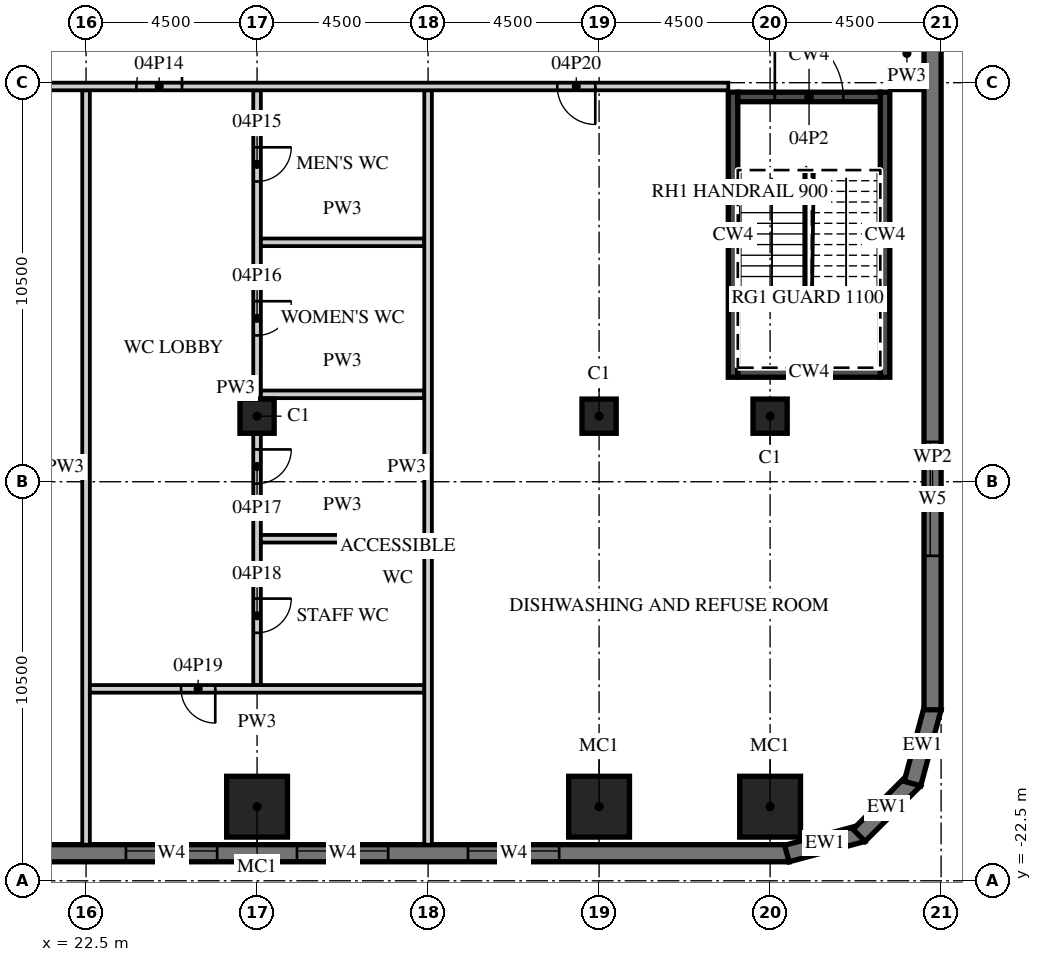
"""IFC4 building model, lengths in metres.
Left out: names, types, materials, properties, quantities, classifications, styles, units other than length and angle.
Written with IfcOpenShell. Run it as: python <this file> out.ifc"""

import sys

from ifc_helpers import new_model, si_unit, direction, frame, frame_2d, origin, origin_2d, place, context, subcontext, project, spatial, polyline, rectangle, outline, extrude, element, fill, save


model = new_model("IFC4")
c1 = context("Model", 3, precision=1e-05, world=origin(), true_north=direction((0.0, 1.0)))
c2 = subcontext(c1, "Body", "Model", "MODEL_VIEW")
j1 = project(units=[si_unit("LENGTHUNIT", "METRE"), si_unit("PLANEANGLEUNIT", "RADIAN")], contexts=[c1])
p1 = place(None, origin())
s1 = spatial("IfcSite", under=j1, at=p1, CompositionType="ELEMENT")
p2 = place(p1, origin())
s2 = spatial("IfcBuilding", under=s1, at=p2, CompositionType="ELEMENT")
p3 = place(p2, frame((0.0, 0.0, 29.0)))
s3 = spatial("IfcBuildingStorey", under=s2, at=p3, CompositionType="ELEMENT", Elevation=29.0)
for number, where, z_axis, x_axis in (
    (1, (27.0, -20.55, 0.0), (0.0, 0.0, 1.0), (1.0, 0.0, 0.0)),
    (2, (36.0, -20.55, 0.0), (0.0, 0.0, 1.0), (1.0, 0.0, 0.0)),
    (3, (40.5, -20.55, 0.0), (0.0, 0.0, 1.0), (1.0, 0.0, 0.0)),
):
    element("IfcColumn", number, at=place(p3, frame(where, z_axis=z_axis, x_axis=x_axis)), inside=s3, PredefinedType="COLUMN", context=c2, shape_type="SweptSolid", body=[
        extrude(rectangle(XDim=1.6, YDim=1.6, at=origin_2d()), origin(), (0.0, 0.0, 1.0), 4.5),
    ])
for number, where, z_axis, x_axis in (
    (4, (27.0, -10.275, 0.0), (0.0, 0.0, 1.0), (1.0, 0.0, 0.0)),
    (5, (36.0, -10.275, 0.0), (0.0, 0.0, 1.0), (1.0, 0.0, 0.0)),
    (6, (40.5, -10.275, 0.0), (0.0, 0.0, 1.0), (1.0, 0.0, 0.0)),
):
    element("IfcColumn", number, at=place(p3, frame(where, z_axis=z_axis, x_axis=x_axis)), inside=s3, PredefinedType="COLUMN", context=c2, shape_type="SweptSolid", body=[
        extrude(rectangle(XDim=0.9, YDim=0.9, at=origin_2d()), origin(), (0.0, 0.0, 1.0), 4.5),
    ])
p4 = place(p3, frame((-13.5, -21.775, 0.0), z_axis=(0.0, 0.0, 1.0), x_axis=(1.0, 0.0, 0.0)))
e7 = element("IfcWall", 7, at=p4, inside=s3, PredefinedType="SOLIDWALL", context=c2, shape_type="SweptSolid", body=[
    extrude(rectangle(XDim=54.5, YDim=0.45, at=frame_2d((27.25, 0.0))), origin(), (0.0, 0.0, 1.0), 4.05),
])
p5 = place(p4, frame((1.05, 0.0, 0.9)))
e8 = element("IfcOpeningElement", 8, at=p5, cuts=e7, PredefinedType="OPENING", context=c2, shape_type="SweptSolid", body=[
    extrude(rectangle(XDim=2.4, YDim=1.8, at=frame_2d((1.2, 0.9))), frame((0.0, 0.235, 0.0), z_axis=(0.0, -1.0, 0.0), x_axis=(1.0, 0.0, 0.0)), (0.0, 0.0, 1.0), 0.47),
])
p6 = place(p4, frame((5.55, 0.0, 0.9)))
e9 = element("IfcOpeningElement", 9, at=p6, cuts=e7, PredefinedType="OPENING", context=c2, shape_type="SweptSolid", body=[
    extrude(rectangle(XDim=2.4, YDim=1.8, at=frame_2d((1.2, 0.9))), frame((0.0, 0.235, 0.0), z_axis=(0.0, -1.0, 0.0), x_axis=(1.0, 0.0, 0.0)), (0.0, 0.0, 1.0), 0.47),
])
p7 = place(p4, frame((10.05, 0.0, 0.9)))
e10 = element("IfcOpeningElement", 10, at=p7, cuts=e7, PredefinedType="OPENING", context=c2, shape_type="SweptSolid", body=[
    extrude(rectangle(XDim=2.4, YDim=1.8, at=frame_2d((1.2, 0.9))), frame((0.0, 0.235, 0.0), z_axis=(0.0, -1.0, 0.0), x_axis=(1.0, 0.0, 0.0)), (0.0, 0.0, 1.0), 0.47),
])
p8 = place(p4, frame((14.55, 0.0, 0.9)))
e11 = element("IfcOpeningElement", 11, at=p8, cuts=e7, PredefinedType="OPENING", context=c2, shape_type="SweptSolid", body=[
    extrude(rectangle(XDim=2.4, YDim=1.8, at=frame_2d((1.2, 0.9))), frame((0.0, 0.235, 0.0), z_axis=(0.0, -1.0, 0.0), x_axis=(1.0, 0.0, 0.0)), (0.0, 0.0, 1.0), 0.47),
])
p9 = place(p4, frame((19.05, 0.0, 0.9)))
e12 = element("IfcOpeningElement", 12, at=p9, cuts=e7, PredefinedType="OPENING", context=c2, shape_type="SweptSolid", body=[
    extrude(rectangle(XDim=2.4, YDim=1.8, at=frame_2d((1.2, 0.9))), frame((0.0, 0.235, 0.0), z_axis=(0.0, -1.0, 0.0), x_axis=(1.0, 0.0, 0.0)), (0.0, 0.0, 1.0), 0.47),
])
p10 = place(p4, frame((23.55, 0.0, 0.9)))
e13 = element("IfcOpeningElement", 13, at=p10, cuts=e7, PredefinedType="OPENING", context=c2, shape_type="SweptSolid", body=[
    extrude(rectangle(XDim=2.4, YDim=1.8, at=frame_2d((1.2, 0.9))), frame((0.0, 0.235, 0.0), z_axis=(0.0, -1.0, 0.0), x_axis=(1.0, 0.0, 0.0)), (0.0, 0.0, 1.0), 0.47),
])
p11 = place(p4, frame((28.05, 0.0, 0.9)))
e14 = element("IfcOpeningElement", 14, at=p11, cuts=e7, PredefinedType="OPENING", context=c2, shape_type="SweptSolid", body=[
    extrude(rectangle(XDim=2.4, YDim=1.8, at=frame_2d((1.2, 0.9))), frame((0.0, 0.235, 0.0), z_axis=(0.0, -1.0, 0.0), x_axis=(1.0, 0.0, 0.0)), (0.0, 0.0, 1.0), 0.47),
])
p12 = place(p4, frame((32.55, 0.0, 0.9)))
e15 = element("IfcOpeningElement", 15, at=p12, cuts=e7, PredefinedType="OPENING", context=c2, shape_type="SweptSolid", body=[
    extrude(rectangle(XDim=2.4, YDim=1.8, at=frame_2d((1.2, 0.9))), frame((0.0, 0.235, 0.0), z_axis=(0.0, -1.0, 0.0), x_axis=(1.0, 0.0, 0.0)), (0.0, 0.0, 1.0), 0.47),
])
p13 = place(p4, frame((37.05, 0.0, 0.9)))
e16 = element("IfcOpeningElement", 16, at=p13, cuts=e7, PredefinedType="OPENING", context=c2, shape_type="SweptSolid", body=[
    extrude(rectangle(XDim=2.4, YDim=1.8, at=frame_2d((1.2, 0.9))), frame((0.0, 0.235, 0.0), z_axis=(0.0, -1.0, 0.0), x_axis=(1.0, 0.0, 0.0)), (0.0, 0.0, 1.0), 0.47),
])
p14 = place(p4, frame((41.55, 0.0, 0.9)))
e17 = element("IfcOpeningElement", 17, at=p14, cuts=e7, PredefinedType="OPENING", context=c2, shape_type="SweptSolid", body=[
    extrude(rectangle(XDim=2.4, YDim=1.8, at=frame_2d((1.2, 0.9))), frame((0.0, 0.235, 0.0), z_axis=(0.0, -1.0, 0.0), x_axis=(1.0, 0.0, 0.0)), (0.0, 0.0, 1.0), 0.47),
])
p15 = place(p4, frame((46.05, 0.0, 0.9)))
e18 = element("IfcOpeningElement", 18, at=p15, cuts=e7, PredefinedType="OPENING", context=c2, shape_type="SweptSolid", body=[
    extrude(rectangle(XDim=2.4, YDim=1.8, at=frame_2d((1.2, 0.9))), frame((0.0, 0.235, 0.0), z_axis=(0.0, -1.0, 0.0), x_axis=(1.0, 0.0, 0.0)), (0.0, 0.0, 1.0), 0.47),
])
p16 = place(p3, frame((40.942, -21.783, 0.0), z_axis=(0.0, 0.0, 1.0), x_axis=(0.965926999034, 0.25881466832, 0.0)))
e19 = element("IfcWall", 19, at=p16, inside=s3, PredefinedType="SOLIDWALL", context=c2, shape_type="SweptSolid", body=[
    extrude(outline(polyline([(0.0, -0.225), (2.071, -0.225), (1.95, 0.225), (0.121, 0.225), (0.0, -0.225)])), origin(), (0.0, 0.0, 1.0), 4.05),
])
p17 = place(p3, frame((42.841, -21.305, 0.0), z_axis=(0.0, 0.0, 1.0), x_axis=(0.707106781187, 0.707106781187, 0.0)))
e20 = element("IfcWall", 20, at=p17, inside=s3, PredefinedType="SOLIDWALL", context=c2, shape_type="SweptSolid", body=[
    extrude(outline(polyline([(0.0, -0.225), (2.071, -0.225), (1.95, 0.225), (0.121, 0.225), (0.0, -0.225)])), origin(), (0.0, 0.0, 1.0), 4.05),
])
p18 = place(p3, frame((44.247, -19.942, 0.0), z_axis=(0.0, 0.0, 1.0), x_axis=(0.25881466832, 0.965926999034, 0.0)))
e21 = element("IfcWall", 21, at=p18, inside=s3, PredefinedType="SOLIDWALL", context=c2, shape_type="SweptSolid", body=[
    extrude(outline(polyline([(-0.0, -0.225), (2.07, -0.225), (1.95, 0.225), (0.12, 0.225), (-0.0, -0.225)])), origin(), (0.0, 0.0, 1.0), 4.05),
])
p19 = place(p3, frame((44.775, -18.0, 0.0), z_axis=(0.0, 0.0, 1.0), x_axis=(0.0, 1.0, 0.0)))
e22 = element("IfcWall", 22, at=p19, inside=s3, PredefinedType="SOLIDWALL", context=c2, shape_type="SweptSolid", body=[
    extrude(rectangle(XDim=36.0, YDim=0.45, at=frame_2d((18.0, 0.0))), origin(), (0.0, 0.0, 1.0), 4.05),
])
p20 = place(p19, frame((4.05, 0.0, 0.9)))
e23 = element("IfcOpeningElement", 23, at=p20, cuts=e22, PredefinedType="OPENING", context=c2, shape_type="SweptSolid", body=[
    extrude(rectangle(XDim=3.0, YDim=1.8, at=frame_2d((1.5, 0.9))), frame((0.0, 0.235, 0.0), z_axis=(0.0, -1.0, 0.0), x_axis=(1.0, 0.0, 0.0)), (0.0, 0.0, 1.0), 0.47),
])
for number, where, z_axis, x_axis in (
    (24, (39.525, -9.25, 0.0), (0.0, 0.0, 1.0), (0.0, 1.0, 0.0)),
    (25, (43.525, -9.25, 0.0), (0.0, 0.0, 1.0), (0.0, 1.0, 0.0)),
):
    element("IfcWall", number, at=place(p3, frame(where, z_axis=z_axis, x_axis=x_axis)), inside=s3, PredefinedType="SHEAR", context=c2, shape_type="SweptSolid", body=[
        extrude(rectangle(XDim=7.5, YDim=0.25, at=frame_2d((3.75, 0.0))), origin(), (0.0, 0.0, 1.0), 4.05),
    ])
p21 = place(p3, frame((39.65, -9.125, 0.0), z_axis=(0.0, 0.0, 1.0), x_axis=(1.0, 0.0, 0.0)))
e26 = element("IfcWall", 26, at=p21, inside=s3, PredefinedType="SHEAR", context=c2, shape_type="SweptSolid", body=[
    extrude(rectangle(XDim=3.75, YDim=0.25, at=frame_2d((1.875, 0.0))), origin(), (0.0, 0.0, 1.0), 4.05),
])
p22 = place(p3, frame((39.65, -1.875, 0.0), z_axis=(0.0, 0.0, 1.0), x_axis=(1.0, 0.0, 0.0)))
e27 = element("IfcWall", 27, at=p22, inside=s3, PredefinedType="SHEAR", context=c2, shape_type="SweptSolid", body=[
    extrude(rectangle(XDim=3.75, YDim=0.25, at=frame_2d((1.875, 0.0))), origin(), (0.0, 0.0, 1.0), 4.05),
])
p23 = place(p22, frame((0.975, 0.0, 0.0)))
e28 = element("IfcOpeningElement", 28, at=p23, cuts=e27, PredefinedType="OPENING", context=c2, shape_type="SweptSolid", body=[
    extrude(rectangle(XDim=1.8, YDim=2.1, at=frame_2d((0.9, 1.05))), frame((0.0, 0.135, 0.0), z_axis=(0.0, -1.0, 0.0), x_axis=(1.0, 0.0, 0.0)), (0.0, 0.0, 1.0), 0.27),
])
p24 = place(p3, frame((22.5, -21.55, 0.0), z_axis=(0.0, 0.0, 1.0), x_axis=(0.0, 1.0, 0.0)))
e29 = element("IfcWall", 29, at=p24, inside=s3, PredefinedType="PARTITIONING", context=c2, shape_type="SweptSolid", body=[
    extrude(rectangle(XDim=19.85, YDim=0.2, at=frame_2d((9.925, 0.0))), origin(), (0.0, 0.0, 1.0), 4.05),
])
p25 = place(p3, frame((27.0, -17.35, 0.0), z_axis=(0.0, 0.0, 1.0), x_axis=(0.0, 1.0, 0.0)))
e30 = element("IfcWall", 30, at=p25, inside=s3, PredefinedType="PARTITIONING", context=c2, shape_type="SweptSolid", body=[
    extrude(rectangle(XDim=15.65, YDim=0.2, at=frame_2d((7.825, 0.0))), origin(), (0.0, 0.0, 1.0), 4.05),
])
p26 = place(p25, frame((13.25, 0.0, 0.0)))
e31 = element("IfcOpeningElement", 31, at=p26, cuts=e30, PredefinedType="OPENING", context=c2, shape_type="SweptSolid", body=[
    extrude(rectangle(XDim=0.9, YDim=2.1, at=frame_2d((0.45, 1.05))), frame((0.0, 0.11, 0.0), z_axis=(0.0, -1.0, 0.0), x_axis=(1.0, 0.0, 0.0)), (0.0, 0.0, 1.0), 0.22),
])
p27 = place(p25, frame((9.2, 0.0, 0.0)))
e32 = element("IfcOpeningElement", 32, at=p27, cuts=e30, PredefinedType="OPENING", context=c2, shape_type="SweptSolid", body=[
    extrude(rectangle(XDim=0.9, YDim=2.1, at=frame_2d((0.45, 1.05))), frame((0.0, 0.11, 0.0), z_axis=(0.0, -1.0, 0.0), x_axis=(1.0, 0.0, 0.0)), (0.0, 0.0, 1.0), 0.22),
])
p28 = place(p25, frame((5.3, 0.0, 0.0)))
e33 = element("IfcOpeningElement", 33, at=p28, cuts=e30, PredefinedType="OPENING", context=c2, shape_type="SweptSolid", body=[
    extrude(rectangle(XDim=0.9, YDim=2.1, at=frame_2d((0.45, 1.05))), frame((0.0, 0.11, 0.0), z_axis=(0.0, -1.0, 0.0), x_axis=(1.0, 0.0, 0.0)), (0.0, 0.0, 1.0), 0.22),
])
p29 = place(p25, frame((1.375, 0.0, 0.0)))
e34 = element("IfcOpeningElement", 34, at=p29, cuts=e30, PredefinedType="OPENING", context=c2, shape_type="SweptSolid", body=[
    extrude(rectangle(XDim=0.9, YDim=2.1, at=frame_2d((0.45, 1.05))), frame((0.0, 0.11, 0.0), z_axis=(0.0, -1.0, 0.0), x_axis=(1.0, 0.0, 0.0)), (0.0, 0.0, 1.0), 0.22),
])
for number, where, z_axis, x_axis in (
    (35, (27.1, -5.7, 0.0), (0.0, 0.0, 1.0), (1.0, 0.0, 0.0)),
    (36, (27.1, -9.7, 0.0), (0.0, 0.0, 1.0), (1.0, 0.0, 0.0)),
    (37, (27.1, -13.5, 0.0), (0.0, 0.0, 1.0), (1.0, 0.0, 0.0)),
):
    element("IfcWall", number, at=place(p3, frame(where, z_axis=z_axis, x_axis=x_axis)), inside=s3, PredefinedType="PARTITIONING", context=c2, shape_type="SweptSolid", body=[
        extrude(rectangle(XDim=4.3, YDim=0.2, at=frame_2d((2.15, 0.0))), origin(), (0.0, 0.0, 1.0), 4.05),
    ])
p30 = place(p3, frame((22.6, -17.45, 0.0), z_axis=(0.0, 0.0, 1.0), x_axis=(1.0, 0.0, 0.0)))
e38 = element("IfcWall", 38, at=p30, inside=s3, PredefinedType="PARTITIONING", context=c2, shape_type="SweptSolid", body=[
    extrude(rectangle(XDim=8.8, YDim=0.2, at=frame_2d((4.4, 0.0))), origin(), (0.0, 0.0, 1.0), 4.05),
])
p31 = place(p30, frame((2.4, 0.0, 0.0)))
e39 = element("IfcOpeningElement", 39, at=p31, cuts=e38, PredefinedType="OPENING", context=c2, shape_type="SweptSolid", body=[
    extrude(rectangle(XDim=0.9, YDim=2.1, at=frame_2d((0.45, 1.05))), frame((0.0, 0.11, 0.0), z_axis=(0.0, -1.0, 0.0), x_axis=(1.0, 0.0, 0.0)), (0.0, 0.0, 1.0), 0.22),
])
p32 = place(p3, frame((31.5, -21.55, 0.0), z_axis=(0.0, 0.0, 1.0), x_axis=(0.0, 1.0, 0.0)))
e40 = element("IfcWall", 40, at=p32, inside=s3, PredefinedType="PARTITIONING", context=c2, shape_type="SweptSolid", body=[
    extrude(rectangle(XDim=19.85, YDim=0.2, at=frame_2d((9.925, 0.0))), origin(), (0.0, 0.0, 1.0), 4.05),
])
p33 = place(p3, frame((-13.3, -1.6, 0.0), z_axis=(0.0, 0.0, 1.0), x_axis=(1.0, 0.0, 0.0)))
e41 = element("IfcWall", 41, at=p33, inside=s3, PredefinedType="PARTITIONING", context=c2, shape_type="SweptSolid", body=[
    extrude(rectangle(XDim=52.7, YDim=0.2, at=frame_2d((26.35, 0.0))), origin(), (0.0, 0.0, 1.0), 4.05),
])
p34 = place(p33, frame((10.21, 0.0, 0.0)))
e42 = element("IfcOpeningElement", 42, at=p34, cuts=e41, PredefinedType="OPENING", context=c2, shape_type="SweptSolid", body=[
    extrude(rectangle(XDim=1.0, YDim=2.1, at=frame_2d((0.5, 1.05))), frame((0.0, 0.11, 0.0), z_axis=(0.0, -1.0, 0.0), x_axis=(1.0, 0.0, 0.0)), (0.0, 0.0, 1.0), 0.22),
])
p35 = place(p33, frame((24.49, 0.0, 0.0)))
e43 = element("IfcOpeningElement", 43, at=p35, cuts=e41, PredefinedType="OPENING", context=c2, shape_type="SweptSolid", body=[
    extrude(rectangle(XDim=1.0, YDim=2.1, at=frame_2d((0.5, 1.05))), frame((0.0, 0.11, 0.0), z_axis=(0.0, -1.0, 0.0), x_axis=(1.0, 0.0, 0.0)), (0.0, 0.0, 1.0), 0.22),
])
p36 = place(p33, frame((37.125, 0.0, 0.0)))
e44 = element("IfcOpeningElement", 44, at=p36, cuts=e41, PredefinedType="OPENING", context=c2, shape_type="SweptSolid", body=[
    extrude(rectangle(XDim=1.2, YDim=2.1, at=frame_2d((0.6, 1.05))), frame((0.0, 0.11, 0.0), z_axis=(0.0, -1.0, 0.0), x_axis=(1.0, 0.0, 0.0)), (0.0, 0.0, 1.0), 0.22),
])
p37 = place(p33, frame((48.2, 0.0, 0.0)))
e45 = element("IfcOpeningElement", 45, at=p37, cuts=e41, PredefinedType="OPENING", context=c2, shape_type="SweptSolid", body=[
    extrude(rectangle(XDim=1.0, YDim=2.1, at=frame_2d((0.5, 1.05))), frame((0.0, 0.11, 0.0), z_axis=(0.0, -1.0, 0.0), x_axis=(1.0, 0.0, 0.0)), (0.0, 0.0, 1.0), 0.22),
])
p38 = place(p3, frame((43.65, -1.6, 0.0), z_axis=(0.0, 0.0, 1.0), x_axis=(1.0, 0.0, 0.0)))
e46 = element("IfcWall", 46, at=p38, inside=s3, PredefinedType="PARTITIONING", context=c2, shape_type="SweptSolid", body=[
    extrude(rectangle(XDim=0.9, YDim=0.2, at=frame_2d((0.45, 0.0))), origin(), (0.0, 0.0, 1.0), 4.05),
])
p39 = place(p13, origin())
e47 = element("IfcWindow", 47, at=p39, inside=s3, PartitioningType="SINGLE_PANEL", PredefinedType="WINDOW", context=c2, shape_type="SweptSolid", body=[
    extrude(rectangle(XDim=2.4, YDim=1.8, at=frame_2d((1.2, 0.9))), frame((0.0, 0.09, 0.0), z_axis=(0.0, -1.0, 0.0), x_axis=(1.0, 0.0, 0.0)), (0.0, 0.0, 1.0), 0.06),
])
fill(e16, e47)
p40 = place(p14, origin())
e48 = element("IfcWindow", 48, at=p40, inside=s3, PartitioningType="SINGLE_PANEL", PredefinedType="WINDOW", context=c2, shape_type="SweptSolid", body=[
    extrude(rectangle(XDim=2.4, YDim=1.8, at=frame_2d((1.2, 0.9))), frame((0.0, 0.09, 0.0), z_axis=(0.0, -1.0, 0.0), x_axis=(1.0, 0.0, 0.0)), (0.0, 0.0, 1.0), 0.06),
])
fill(e17, e48)
p41 = place(p15, origin())
e49 = element("IfcWindow", 49, at=p41, inside=s3, PartitioningType="SINGLE_PANEL", PredefinedType="WINDOW", context=c2, shape_type="SweptSolid", body=[
    extrude(rectangle(XDim=2.4, YDim=1.8, at=frame_2d((1.2, 0.9))), frame((0.0, 0.09, 0.0), z_axis=(0.0, -1.0, 0.0), x_axis=(1.0, 0.0, 0.0)), (0.0, 0.0, 1.0), 0.06),
])
fill(e18, e49)
p42 = place(p20, origin())
e50 = element("IfcWindow", 50, at=p42, inside=s3, PartitioningType="SINGLE_PANEL", PredefinedType="WINDOW", context=c2, shape_type="SweptSolid", body=[
    extrude(rectangle(XDim=3.0, YDim=1.8, at=frame_2d((1.5, 0.9))), frame((0.0, 0.09, 0.0), z_axis=(0.0, -1.0, 0.0), x_axis=(1.0, 0.0, 0.0)), (0.0, 0.0, 1.0), 0.06),
])
fill(e23, e50)
p43 = place(p23, origin())
e51 = element("IfcDoor", 51, at=p43, inside=s3, OperationType="DOUBLE_DOOR_DOUBLE_SWING", PredefinedType="DOOR", context=c2, shape_type="SweptSolid", body=[
    extrude(rectangle(XDim=1.8, YDim=2.1, at=frame_2d((0.9, 1.05))), frame((0.0, 0.025, 0.0), z_axis=(0.0, -1.0, 0.0), x_axis=(1.0, 0.0, 0.0)), (0.0, 0.0, 1.0), 0.05),
])
fill(e28, e51)
p44 = place(p36, origin())
e52 = element("IfcDoor", 52, at=p44, inside=s3, OperationType="SINGLE_SWING_RIGHT", PredefinedType="DOOR", context=c2, shape_type="SweptSolid", body=[
    extrude(rectangle(XDim=1.2, YDim=2.1, at=frame_2d((0.6, 1.05))), frame((0.0, 0.025, 0.0), z_axis=(0.0, -1.0, 0.0), x_axis=(1.0, 0.0, 0.0)), (0.0, 0.0, 1.0), 0.05),
])
fill(e44, e52)
p45 = place(p26, origin())
e53 = element("IfcDoor", 53, at=p45, inside=s3, OperationType="SINGLE_SWING_RIGHT", PredefinedType="DOOR", context=c2, shape_type="SweptSolid", body=[
    extrude(rectangle(XDim=0.9, YDim=2.1, at=frame_2d((0.45, 1.05))), frame((0.0, 0.025, 0.0), z_axis=(0.0, -1.0, 0.0), x_axis=(1.0, 0.0, 0.0)), (0.0, 0.0, 1.0), 0.05),
])
fill(e31, e53)
p46 = place(p27, origin())
e54 = element("IfcDoor", 54, at=p46, inside=s3, OperationType="SINGLE_SWING_RIGHT", PredefinedType="DOOR", context=c2, shape_type="SweptSolid", body=[
    extrude(rectangle(XDim=0.9, YDim=2.1, at=frame_2d((0.45, 1.05))), frame((0.0, 0.025, 0.0), z_axis=(0.0, -1.0, 0.0), x_axis=(1.0, 0.0, 0.0)), (0.0, 0.0, 1.0), 0.05),
])
fill(e32, e54)
p47 = place(p28, origin())
e55 = element("IfcDoor", 55, at=p47, inside=s3, OperationType="SINGLE_SWING_RIGHT", PredefinedType="DOOR", context=c2, shape_type="SweptSolid", body=[
    extrude(rectangle(XDim=0.9, YDim=2.1, at=frame_2d((0.45, 1.05))), frame((0.0, 0.025, 0.0), z_axis=(0.0, -1.0, 0.0), x_axis=(1.0, 0.0, 0.0)), (0.0, 0.0, 1.0), 0.05),
])
fill(e33, e55)
p48 = place(p29, origin())
e56 = element("IfcDoor", 56, at=p48, inside=s3, OperationType="SINGLE_SWING_RIGHT", PredefinedType="DOOR", context=c2, shape_type="SweptSolid", body=[
    extrude(rectangle(XDim=0.9, YDim=2.1, at=frame_2d((0.45, 1.05))), frame((0.0, 0.025, 0.0), z_axis=(0.0, -1.0, 0.0), x_axis=(1.0, 0.0, 0.0)), (0.0, 0.0, 1.0), 0.05),
])
fill(e34, e56)
p49 = place(p31, origin())
e57 = element("IfcDoor", 57, at=p49, inside=s3, OperationType="SINGLE_SWING_RIGHT", PredefinedType="DOOR", context=c2, shape_type="SweptSolid", body=[
    extrude(rectangle(XDim=0.9, YDim=2.1, at=frame_2d((0.45, 1.05))), frame((0.0, 0.025, 0.0), z_axis=(0.0, -1.0, 0.0), x_axis=(1.0, 0.0, 0.0)), (0.0, 0.0, 1.0), 0.05),
])
fill(e39, e57)
p50 = place(p37, origin())
e58 = element("IfcDoor", 58, at=p50, inside=s3, OperationType="SINGLE_SWING_RIGHT", PredefinedType="DOOR", context=c2, shape_type="SweptSolid", body=[
    extrude(rectangle(XDim=1.0, YDim=2.1, at=frame_2d((0.5, 1.05))), frame((0.0, 0.025, 0.0), z_axis=(0.0, -1.0, 0.0), x_axis=(1.0, 0.0, 0.0)), (0.0, 0.0, 1.0), 0.05),
])
fill(e45, e58)
save(model, sys.argv[1])
